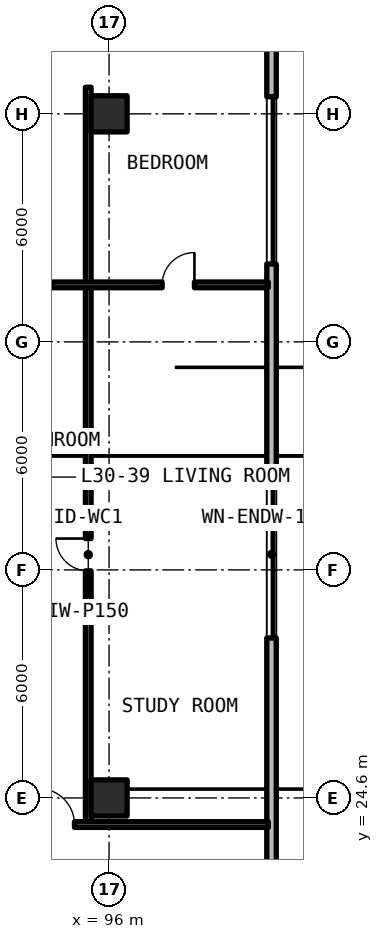
"""IFC4 building model, lengths in metres.
Left out: names, types, materials, properties, quantities, classifications, styles, units other than length and angle.
Written with IfcOpenShell. Run it as: python <this file> out.ifc"""

import sys

from ifc_helpers import new_model, si_unit, direction, frame, frame_2d, origin, origin_2d, place, context, subcontext, project, spatial, rectangle, extrude, element, fill, save


model = new_model("IFC4")
c1 = context("Model", 3, precision=1e-05, world=origin(), true_north=direction((0.0, 1.0)))
c2 = subcontext(c1, "Body", "Model", "MODEL_VIEW")
j1 = project(units=[si_unit("LENGTHUNIT", "METRE"), si_unit("PLANEANGLEUNIT", "RADIAN")], contexts=[c1])
p1 = place(None, origin())
s1 = spatial("IfcSite", under=j1, at=p1, CompositionType="ELEMENT")
p2 = place(p1, origin())
s2 = spatial("IfcBuilding", under=s1, at=p2, CompositionType="ELEMENT")
p3 = place(p2, frame((0.0, 0.0, 108.57)))
s3 = spatial("IfcBuildingStorey", under=s2, at=p3, CompositionType="ELEMENT", Elevation=108.57)
for number, where, z_axis, x_axis in (
    (1, (96.0, 24.6, 0.0), (0.0, 0.0, 1.0), (1.0, 0.0, 0.0)),
    (2, (96.0, 42.6, 0.0), (0.0, 0.0, 1.0), (1.0, 0.0, 0.0)),
):
    element("IfcColumn", number, at=place(p3, frame(where, z_axis=z_axis, x_axis=x_axis)), inside=s3, PredefinedType="COLUMN", context=c2, shape_type="SweptSolid", body=[
        extrude(rectangle(XDim=0.95, YDim=0.95, at=origin_2d()), origin(), (0.0, 0.0, 1.0), 3.63),
    ])
p4 = place(p3, frame((100.275, 13.852, 0.0), z_axis=(0.0, 0.0, 1.0), x_axis=(0.0, 1.0, 0.0)))
e3 = element("IfcWall", 3, at=p4, inside=s3, PredefinedType="SOLIDWALL", context=c2, shape_type="SweptSolid", body=[
    extrude(rectangle(XDim=39.496, YDim=0.25, at=frame_2d((19.748, 0.0))), origin(), (0.0, 0.0, 1.0), 3.41),
])
p5 = place(p4, frame((14.958, 0.0, 0.78)))
e4 = element("IfcOpeningElement", 4, at=p5, cuts=e3, PredefinedType="OPENING", context=c2, shape_type="SweptSolid", body=[
    extrude(rectangle(XDim=4.4, YDim=1.66, at=frame_2d((2.2, 0.83))), frame((0.0, 0.135, 0.0), z_axis=(0.0, -1.0, 0.0), x_axis=(1.0, 0.0, 0.0)), (0.0, 0.0, 1.0), 0.27),
])
p6 = place(p4, frame((24.798, 0.0, 0.78)))
e5 = element("IfcOpeningElement", 5, at=p6, cuts=e3, PredefinedType="OPENING", context=c2, shape_type="SweptSolid", body=[
    extrude(rectangle(XDim=4.4, YDim=1.66, at=frame_2d((2.2, 0.83))), frame((0.0, 0.135, 0.0), z_axis=(0.0, -1.0, 0.0), x_axis=(1.0, 0.0, 0.0)), (0.0, 0.0, 1.0), 0.27),
])
p7 = place(p4, frame((5.604, 0.0, 0.78)))
e6 = element("IfcOpeningElement", 6, at=p7, cuts=e3, PredefinedType="OPENING", context=c2, shape_type="SweptSolid", body=[
    extrude(rectangle(XDim=1.4, YDim=1.65, at=frame_2d((0.7, 0.825))), frame((0.0, 0.135, 0.0), z_axis=(0.0, -1.0, 0.0), x_axis=(1.0, 0.0, 0.0)), (0.0, 0.0, 1.0), 0.27),
])
p8 = place(p3, frame((95.452, 23.9, 0.0), z_axis=(0.0, 0.0, 1.0), x_axis=(0.0, 1.0, 0.0)))
e7 = element("IfcWall", 7, at=p8, inside=s3, PredefinedType="PARTITIONING", context=c2, shape_type="SweptSolid", body=[
    extrude(rectangle(XDim=14.2, YDim=0.15, at=frame_2d((7.1, 0.0))), origin(), (0.0, 0.0, 1.0), 2.63),
])
p9 = place(p8, frame((6.675, 0.0, 0.0)))
e8 = element("IfcOpeningElement", 8, at=p9, cuts=e7, PredefinedType="OPENING", context=c2, shape_type="SweptSolid", body=[
    extrude(rectangle(XDim=0.85, YDim=2.1, at=frame_2d((0.425, 1.05))), frame((0.0, 0.085, 0.0), z_axis=(0.0, -1.0, 0.0), x_axis=(1.0, 0.0, 0.0)), (0.0, 0.0, 1.0), 0.17),
])
p10 = place(p3, frame((95.452, 38.1, 0.0), z_axis=(0.0, 0.0, 1.0), x_axis=(0.0, 1.0, 0.0)))
e9 = element("IfcWall", 9, at=p10, inside=s3, PredefinedType="PARTITIONING", context=c2, shape_type="SweptSolid", body=[
    extrude(rectangle(XDim=5.2, YDim=0.15, at=frame_2d((2.6, 0.0))), origin(), (0.0, 0.0, 1.0), 2.63),
])
p11 = place(p3, frame((90.32, 38.1, 0.0), z_axis=(0.0, 0.0, 1.0), x_axis=(1.0, 0.0, 0.0)))
e10 = element("IfcWall", 10, at=p11, inside=s3, PredefinedType="PARTITIONING", context=c2, shape_type="SweptSolid", body=[
    extrude(rectangle(XDim=9.87, YDim=0.15, at=frame_2d((4.935, 0.0))), origin(), (0.0, 0.0, 1.0), 2.63),
])
p12 = place(p11, frame((3.316, 0.0, 0.0)))
e11 = element("IfcOpeningElement", 11, at=p12, cuts=e10, PredefinedType="OPENING", context=c2, shape_type="SweptSolid", body=[
    extrude(rectangle(XDim=0.85, YDim=2.1, at=frame_2d((0.425, 1.05))), frame((0.0, 0.085, 0.0), z_axis=(0.0, -1.0, 0.0), x_axis=(1.0, 0.0, 0.0)), (0.0, 0.0, 1.0), 0.17),
])
p13 = place(p11, frame((7.076, 0.0, 0.0)))
e12 = element("IfcOpeningElement", 12, at=p13, cuts=e10, PredefinedType="OPENING", context=c2, shape_type="SweptSolid", body=[
    extrude(rectangle(XDim=0.85, YDim=2.1, at=frame_2d((0.425, 1.05))), frame((0.0, 0.085, 0.0), z_axis=(0.0, -1.0, 0.0), x_axis=(1.0, 0.0, 0.0)), (0.0, 0.0, 1.0), 0.17),
])
p14 = place(p3, frame((90.32, 23.9, 0.0), z_axis=(0.0, 0.0, 1.0), x_axis=(1.0, 0.0, 0.0)))
e13 = element("IfcWall", 13, at=p14, inside=s3, PredefinedType="SOLIDWALL", context=c2, shape_type="SweptSolid", body=[
    extrude(rectangle(XDim=9.87, YDim=0.15, at=frame_2d((4.935, 0.0))), origin(), (0.0, 0.0, 1.0), 2.63),
])
p15 = place(p14, frame((3.82, 0.0, 0.0)))
e14 = element("IfcOpeningElement", 14, at=p15, cuts=e13, PredefinedType="OPENING", context=c2, shape_type="SweptSolid", body=[
    extrude(rectangle(XDim=0.95, YDim=2.15, at=frame_2d((0.475, 1.075))), frame((0.0, 0.085, 0.0), z_axis=(0.0, -1.0, 0.0), x_axis=(1.0, 0.0, 0.0)), (0.0, 0.0, 1.0), 0.17),
])
p16 = place(p5, origin())
e15 = element("IfcWindow", 15, at=p16, inside=s3, PartitioningType="SINGLE_PANEL", PredefinedType="WINDOW", context=c2, shape_type="SweptSolid", body=[
    extrude(rectangle(XDim=4.4, YDim=1.66, at=frame_2d((2.2, 0.83))), frame((0.0, 0.03, 0.0), z_axis=(0.0, -1.0, 0.0), x_axis=(1.0, 0.0, 0.0)), (0.0, 0.0, 1.0), 0.06),
])
fill(e4, e15)
p17 = place(p6, origin())
e16 = element("IfcWindow", 16, at=p17, inside=s3, PartitioningType="SINGLE_PANEL", PredefinedType="WINDOW", context=c2, shape_type="SweptSolid", body=[
    extrude(rectangle(XDim=4.4, YDim=1.66, at=frame_2d((2.2, 0.83))), frame((0.0, 0.03, 0.0), z_axis=(0.0, -1.0, 0.0), x_axis=(1.0, 0.0, 0.0)), (0.0, 0.0, 1.0), 0.06),
])
fill(e5, e16)
p18 = place(p9, origin())
e17 = element("IfcDoor", 17, at=p18, inside=s3, OperationType="SINGLE_SWING_RIGHT", PredefinedType="DOOR", context=c2, shape_type="SweptSolid", body=[
    extrude(rectangle(XDim=0.85, YDim=2.1, at=frame_2d((0.425, 1.05))), frame((0.0, 0.025, 0.0), z_axis=(0.0, -1.0, 0.0), x_axis=(1.0, 0.0, 0.0)), (0.0, 0.0, 1.0), 0.05),
])
fill(e8, e17)
p19 = place(p13, origin())
e18 = element("IfcDoor", 18, at=p19, inside=s3, OperationType="SINGLE_SWING_RIGHT", PredefinedType="DOOR", context=c2, shape_type="SweptSolid", body=[
    extrude(rectangle(XDim=0.85, YDim=2.1, at=frame_2d((0.425, 1.05))), frame((0.0, 0.025, 0.0), z_axis=(0.0, -1.0, 0.0), x_axis=(1.0, 0.0, 0.0)), (0.0, 0.0, 1.0), 0.05),
])
fill(e12, e18)
p20 = place(p15, origin())
e19 = element("IfcDoor", 19, at=p20, inside=s3, OperationType="SINGLE_SWING_LEFT", PredefinedType="DOOR", context=c2, shape_type="SweptSolid", body=[
    extrude(rectangle(XDim=0.95, YDim=2.15, at=frame_2d((0.475, 1.075))), frame((0.0, 0.025, 0.0), z_axis=(0.0, -1.0, 0.0), x_axis=(1.0, 0.0, 0.0)), (0.0, 0.0, 1.0), 0.05),
])
fill(e14, e19)
save(model, sys.argv[1])
